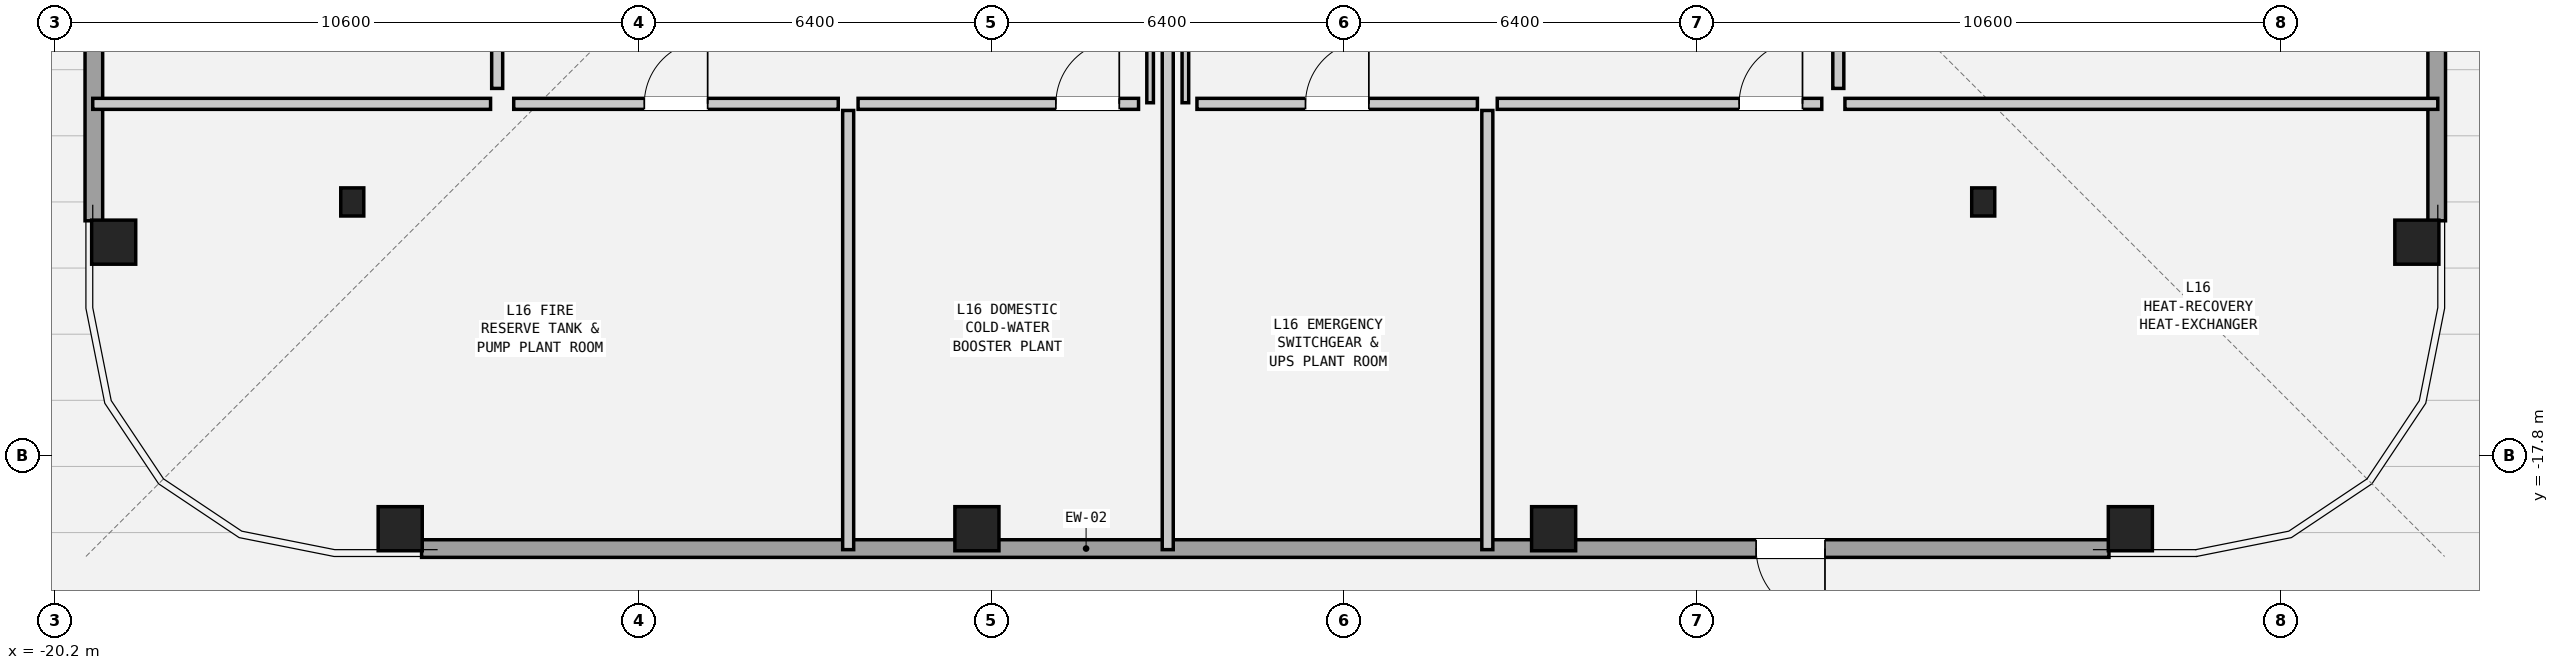
"""IFC4 building model, lengths in metres.
Left out: names, types, materials, properties, quantities, classifications, styles, units other than length and angle.
Written with IfcOpenShell. Run it as: python <this file> out.ifc"""

import sys

from ifc_helpers import new_model, si_unit, direction, frame, frame_2d, origin, origin_2d, place, context, subcontext, project, spatial, rectangle, hollow_rectangle, i_section, extrude, element, fill, save


model = new_model("IFC4")
c1 = context("Model", 3, precision=1e-05, world=origin(), true_north=direction((0.0, 1.0)))
c2 = subcontext(c1, "Body", "Model", "MODEL_VIEW")
j1 = project(units=[si_unit("LENGTHUNIT", "METRE"), si_unit("PLANEANGLEUNIT", "RADIAN")], contexts=[c1])
p1 = place(None, origin())
s1 = spatial("IfcSite", under=j1, at=p1, CompositionType="ELEMENT")
p2 = place(p1, origin())
s2 = spatial("IfcBuilding", under=s1, at=p2, CompositionType="ELEMENT")
p3 = place(p2, frame((0.0, 0.0, 57.9)))
s3 = spatial("IfcBuildingStorey", under=s2, at=p3, CompositionType="ELEMENT", Elevation=57.9)
for number, where, z_axis, x_axis in (
    (1, (-13.93, -19.13, 0.0), (0.0, 0.0, 1.0), (1.0, 0.0, 0.0)),
    (2, (-3.463, -19.13, 0.0), (0.0, 0.0, 1.0), (1.0, 0.0, 0.0)),
    (3, (7.003, -19.13, 0.0), (0.0, 0.0, 1.0), (1.0, 0.0, 0.0)),
    (4, (17.47, -19.13, 0.0), (0.0, 0.0, 1.0), (1.0, 0.0, 0.0)),
    (5, (22.67, -13.93, 0.0), (0.0, 0.0, 1.0), (0.0, 1.0, 0.0)),
    (6, (-19.13, -13.93, 0.0), (0.0, 0.0, 1.0), (0.0, 1.0, 0.0)),
):
    element("IfcColumn", number, at=place(p3, frame(where, z_axis=z_axis, x_axis=x_axis)), inside=s3, PredefinedType="COLUMN", context=c2, shape_type="SweptSolid", body=[
        extrude(hollow_rectangle(XDim=0.8, YDim=0.8, WallThickness=0.05, at=origin_2d()), origin(), (0.0, 0.0, 1.0), 3.6),
    ])
for number, where, z_axis, x_axis in (
    (7, (-14.8, -13.2, 0.0), (0.0, 0.0, 1.0), (1.0, 0.0, 0.0)),
    (8, (14.8, -13.2, 0.0), (0.0, 0.0, 1.0), (1.0, 0.0, 0.0)),
):
    element("IfcColumn", number, at=place(p3, frame(where, z_axis=z_axis, x_axis=x_axis)), inside=s3, PredefinedType="COLUMN", context=c2, shape_type="SweptSolid", body=[
        extrude(i_section(OverallWidth=0.418, OverallDepth=0.51, WebThickness=0.042, FlangeThickness=0.068, at=origin_2d()), origin(), (0.0, 0.0, 1.0), 3.6),
    ])
p4 = place(p3, frame((17.082, -19.49, 0.0), z_axis=(0.0, 0.0, 1.0), x_axis=(-1.0, 0.0, 0.0)))
e9 = element("IfcWall", 9, at=p4, inside=s3, PredefinedType="SOLIDWALL", context=c2, shape_type="SweptSolid", body=[
    extrude(rectangle(XDim=30.624, YDim=0.32, at=frame_2d((15.312, 0.0))), origin(), (0.0, 0.0, 1.0), 2.242),
])
p5 = place(p4, frame((5.154, 0.0, 0.0)))
e10 = element("IfcOpeningElement", 10, at=p5, cuts=e9, PredefinedType="OPENING", context=c2, shape_type="SweptSolid", body=[
    extrude(rectangle(XDim=1.25, YDim=2.02, at=frame_2d((0.625, 1.01))), frame((0.0, 0.172, 0.0), z_axis=(0.0, -1.0, 0.0), x_axis=(1.0, 0.0, 0.0)), (0.0, 0.0, 1.0), 0.344),
])
for number, where, z_axis, x_axis in (
    (11, (23.03, 17.082, 0.0), (0.0, 0.0, 1.0), (0.0, -1.0, 0.0)),
    (12, (-19.49, -13.542, 0.0), (0.0, 0.0, 1.0), (0.0, 1.0, 0.0)),
):
    element("IfcWall", number, at=place(p3, frame(where, z_axis=z_axis, x_axis=x_axis)), inside=s3, PredefinedType="SOLIDWALL", context=c2, shape_type="SweptSolid", body=[
        extrude(rectangle(XDim=30.624, YDim=0.32, at=frame_2d((15.312, 0.0))), origin(), (0.0, 0.0, 1.0), 2.242),
    ])
p6 = place(p3, frame((0.0, -19.51, 0.0), z_axis=(0.0, 0.0, 1.0), x_axis=(0.0, 1.0, 0.0)))
e13 = element("IfcWall", 13, at=p6, inside=s3, PredefinedType="PARTITIONING", context=c2, shape_type="SweptSolid", body=[
    extrude(rectangle(XDim=10.47, YDim=0.2, at=frame_2d((5.235, 0.0))), origin(), (0.0, 0.0, 1.0), 2.901),
])
for number, where, z_axis, x_axis in (
    (14, (-0.32, -11.4, 0.0), (0.0, 0.0, 1.0), (0.0, 1.0, 0.0)),
    (15, (0.32, -11.4, 0.0), (0.0, 0.0, 1.0), (0.0, 1.0, 0.0)),
):
    element("IfcWall", number, at=place(p3, frame(where, z_axis=z_axis, x_axis=x_axis)), inside=s3, PredefinedType="PARTITIONING", context=c2, shape_type="SweptSolid", body=[
        extrude(rectangle(XDim=2.36, YDim=0.12, at=frame_2d((1.18, 0.0))), origin(), (0.0, 0.0, 1.0), 2.901),
    ])
p7 = place(p3, frame((-11.87, -11.42, 0.0), z_axis=(0.0, 0.0, 1.0), x_axis=(1.0, 0.0, 0.0)))
e16 = element("IfcWall", 16, at=p7, inside=s3, PredefinedType="PARTITIONING", context=c2, shape_type="SweptSolid", body=[
    extrude(rectangle(XDim=5.89, YDim=0.2, at=frame_2d((2.945, 0.0))), origin(), (0.0, 0.0, 1.0), 2.901),
])
p8 = place(p7, frame((2.37, 0.0, 0.0)))
e17 = element("IfcOpeningElement", 17, at=p8, cuts=e16, PredefinedType="OPENING", context=c2, shape_type="SweptSolid", body=[
    extrude(rectangle(XDim=1.15, YDim=2.1, at=frame_2d((0.575, 1.05))), frame((0.0, 0.112, 0.0), z_axis=(0.0, -1.0, 0.0), x_axis=(1.0, 0.0, 0.0)), (0.0, 0.0, 1.0), 0.224),
])
p9 = place(p3, frame((-5.8, -19.51, 0.0), z_axis=(0.0, 0.0, 1.0), x_axis=(0.0, 1.0, 0.0)))
e18 = element("IfcWall", 18, at=p9, inside=s3, PredefinedType="PARTITIONING", context=c2, shape_type="SweptSolid", body=[
    extrude(rectangle(XDim=7.97, YDim=0.2, at=frame_2d((3.985, 0.0))), origin(), (0.0, 0.0, 1.0), 2.901),
])
p10 = place(p3, frame((-5.62, -11.42, 0.0), z_axis=(0.0, 0.0, 1.0), x_axis=(1.0, 0.0, 0.0)))
e19 = element("IfcWall", 19, at=p10, inside=s3, PredefinedType="PARTITIONING", context=c2, shape_type="SweptSolid", body=[
    extrude(rectangle(XDim=5.09, YDim=0.2, at=frame_2d((2.545, 0.0))), origin(), (0.0, 0.0, 1.0), 3.38),
])
p11 = place(p10, frame((3.59, 0.0, 0.0)))
e20 = element("IfcOpeningElement", 20, at=p11, cuts=e19, PredefinedType="OPENING", context=c2, shape_type="SweptSolid", body=[
    extrude(rectangle(XDim=1.15, YDim=2.1, at=frame_2d((0.575, 1.05))), frame((0.0, 0.112, 0.0), z_axis=(0.0, -1.0, 0.0), x_axis=(1.0, 0.0, 0.0)), (0.0, 0.0, 1.0), 0.224),
])
p12 = place(p3, frame((0.53, -11.42, 0.0), z_axis=(0.0, 0.0, 1.0), x_axis=(1.0, 0.0, 0.0)))
e21 = element("IfcWall", 21, at=p12, inside=s3, PredefinedType="PARTITIONING", context=c2, shape_type="SweptSolid", body=[
    extrude(rectangle(XDim=5.09, YDim=0.2, at=frame_2d((2.545, 0.0))), origin(), (0.0, 0.0, 1.0), 3.38),
])
p13 = place(p12, frame((1.97, 0.0, 0.0)))
e22 = element("IfcOpeningElement", 22, at=p13, cuts=e21, PredefinedType="OPENING", context=c2, shape_type="SweptSolid", body=[
    extrude(rectangle(XDim=1.15, YDim=2.1, at=frame_2d((0.575, 1.05))), frame((0.0, 0.112, 0.0), z_axis=(0.0, -1.0, 0.0), x_axis=(1.0, 0.0, 0.0)), (0.0, 0.0, 1.0), 0.224),
])
p14 = place(p3, frame((5.8, -19.51, 0.0), z_axis=(0.0, 0.0, 1.0), x_axis=(0.0, 1.0, 0.0)))
e23 = element("IfcWall", 23, at=p14, inside=s3, PredefinedType="PARTITIONING", context=c2, shape_type="SweptSolid", body=[
    extrude(rectangle(XDim=7.97, YDim=0.2, at=frame_2d((3.985, 0.0))), origin(), (0.0, 0.0, 1.0), 2.901),
])
p15 = place(p3, frame((5.98, -11.42, 0.0), z_axis=(0.0, 0.0, 1.0), x_axis=(1.0, 0.0, 0.0)))
e24 = element("IfcWall", 24, at=p15, inside=s3, PredefinedType="PARTITIONING", context=c2, shape_type="SweptSolid", body=[
    extrude(rectangle(XDim=5.89, YDim=0.2, at=frame_2d((2.945, 0.0))), origin(), (0.0, 0.0, 1.0), 2.901),
])
p16 = place(p15, frame((4.39, 0.0, 0.0)))
e25 = element("IfcOpeningElement", 25, at=p16, cuts=e24, PredefinedType="OPENING", context=c2, shape_type="SweptSolid", body=[
    extrude(rectangle(XDim=1.15, YDim=2.1, at=frame_2d((0.575, 1.05))), frame((0.0, 0.112, 0.0), z_axis=(0.0, -1.0, 0.0), x_axis=(1.0, 0.0, 0.0)), (0.0, 0.0, 1.0), 0.224),
])
p17 = place(p3, frame((-19.51, -11.42, 0.0), z_axis=(0.0, 0.0, 1.0), x_axis=(1.0, 0.0, 0.0)))
e26 = element("IfcWall", 26, at=p17, inside=s3, PredefinedType="PARTITIONING", context=c2, shape_type="SweptSolid", body=[
    extrude(rectangle(XDim=7.22, YDim=0.2, at=frame_2d((3.61, 0.0))), origin(), (0.0, 0.0, 1.0), 2.901),
])
p18 = place(p3, frame((12.29, -11.42, 0.0), z_axis=(0.0, 0.0, 1.0), x_axis=(1.0, 0.0, 0.0)))
e27 = element("IfcWall", 27, at=p18, inside=s3, PredefinedType="PARTITIONING", context=c2, shape_type="SweptSolid", body=[
    extrude(rectangle(XDim=10.76, YDim=0.2, at=frame_2d((5.38, 0.0))), origin(), (0.0, 0.0, 1.0), 2.901),
])
p19 = place(p3, frame((-12.17, -11.14, 0.0), z_axis=(0.0, 0.0, 1.0), x_axis=(0.0, 1.0, 0.0)))
e28 = element("IfcWall", 28, at=p19, inside=s3, PredefinedType="PARTITIONING", context=c2, shape_type="SweptSolid", body=[
    extrude(rectangle(XDim=11.53, YDim=0.2, at=frame_2d((5.765, 0.0))), origin(), (0.0, 0.0, 1.0), 3.38),
])
p20 = place(p19, frame((5.19, 0.0, 0.0)))
e29 = element("IfcOpeningElement", 29, at=p20, cuts=e28, PredefinedType="OPENING", context=c2, shape_type="SweptSolid", body=[
    extrude(rectangle(XDim=1.15, YDim=2.1, at=frame_2d((0.575, 1.05))), frame((0.0, 0.112, 0.0), z_axis=(0.0, -1.0, 0.0), x_axis=(1.0, 0.0, 0.0)), (0.0, 0.0, 1.0), 0.224),
])
p21 = place(p3, frame((12.17, -11.14, 0.0), z_axis=(0.0, 0.0, 1.0), x_axis=(0.0, 1.0, 0.0)))
e30 = element("IfcWall", 30, at=p21, inside=s3, PredefinedType="PARTITIONING", context=c2, shape_type="SweptSolid", body=[
    extrude(rectangle(XDim=11.53, YDim=0.2, at=frame_2d((5.765, 0.0))), origin(), (0.0, 0.0, 1.0), 3.38),
])
p22 = place(p21, frame((5.19, 0.0, 0.0)))
e31 = element("IfcOpeningElement", 31, at=p22, cuts=e30, PredefinedType="OPENING", context=c2, shape_type="SweptSolid", body=[
    extrude(rectangle(XDim=1.15, YDim=2.1, at=frame_2d((0.575, 1.05))), frame((0.0, 0.112, 0.0), z_axis=(0.0, -1.0, 0.0), x_axis=(1.0, 0.0, 0.0)), (0.0, 0.0, 1.0), 0.224),
])
p23 = place(p5, origin())
e32 = element("IfcDoor", 32, at=p23, inside=s3, OperationType="SINGLE_SWING_LEFT", PredefinedType="DOOR", context=c2, shape_type="SweptSolid", body=[
    extrude(rectangle(XDim=1.25, YDim=2.02, at=frame_2d((0.625, 1.01))), frame((0.0, 0.025, 0.0), z_axis=(0.0, -1.0, 0.0), x_axis=(1.0, 0.0, 0.0)), (0.0, 0.0, 1.0), 0.05),
])
fill(e10, e32)
p24 = place(p8, origin())
e33 = element("IfcDoor", 33, at=p24, inside=s3, OperationType="SINGLE_SWING_RIGHT", PredefinedType="DOOR", context=c2, shape_type="SweptSolid", body=[
    extrude(rectangle(XDim=1.15, YDim=2.1, at=frame_2d((0.575, 1.05))), frame((0.0, 0.025, 0.0), z_axis=(0.0, -1.0, 0.0), x_axis=(1.0, 0.0, 0.0)), (0.0, 0.0, 1.0), 0.05),
])
fill(e17, e33)
p25 = place(p11, origin())
e34 = element("IfcDoor", 34, at=p25, inside=s3, OperationType="SINGLE_SWING_RIGHT", PredefinedType="DOOR", context=c2, shape_type="SweptSolid", body=[
    extrude(rectangle(XDim=1.15, YDim=2.1, at=frame_2d((0.575, 1.05))), frame((0.0, 0.025, 0.0), z_axis=(0.0, -1.0, 0.0), x_axis=(1.0, 0.0, 0.0)), (0.0, 0.0, 1.0), 0.05),
])
fill(e20, e34)
p26 = place(p13, origin())
e35 = element("IfcDoor", 35, at=p26, inside=s3, OperationType="SINGLE_SWING_RIGHT", PredefinedType="DOOR", context=c2, shape_type="SweptSolid", body=[
    extrude(rectangle(XDim=1.15, YDim=2.1, at=frame_2d((0.575, 1.05))), frame((0.0, 0.025, 0.0), z_axis=(0.0, -1.0, 0.0), x_axis=(1.0, 0.0, 0.0)), (0.0, 0.0, 1.0), 0.05),
])
fill(e22, e35)
p27 = place(p16, origin())
e36 = element("IfcDoor", 36, at=p27, inside=s3, OperationType="SINGLE_SWING_RIGHT", PredefinedType="DOOR", context=c2, shape_type="SweptSolid", body=[
    extrude(rectangle(XDim=1.15, YDim=2.1, at=frame_2d((0.575, 1.05))), frame((0.0, 0.025, 0.0), z_axis=(0.0, -1.0, 0.0), x_axis=(1.0, 0.0, 0.0)), (0.0, 0.0, 1.0), 0.05),
])
fill(e25, e36)
save(model, sys.argv[1])
